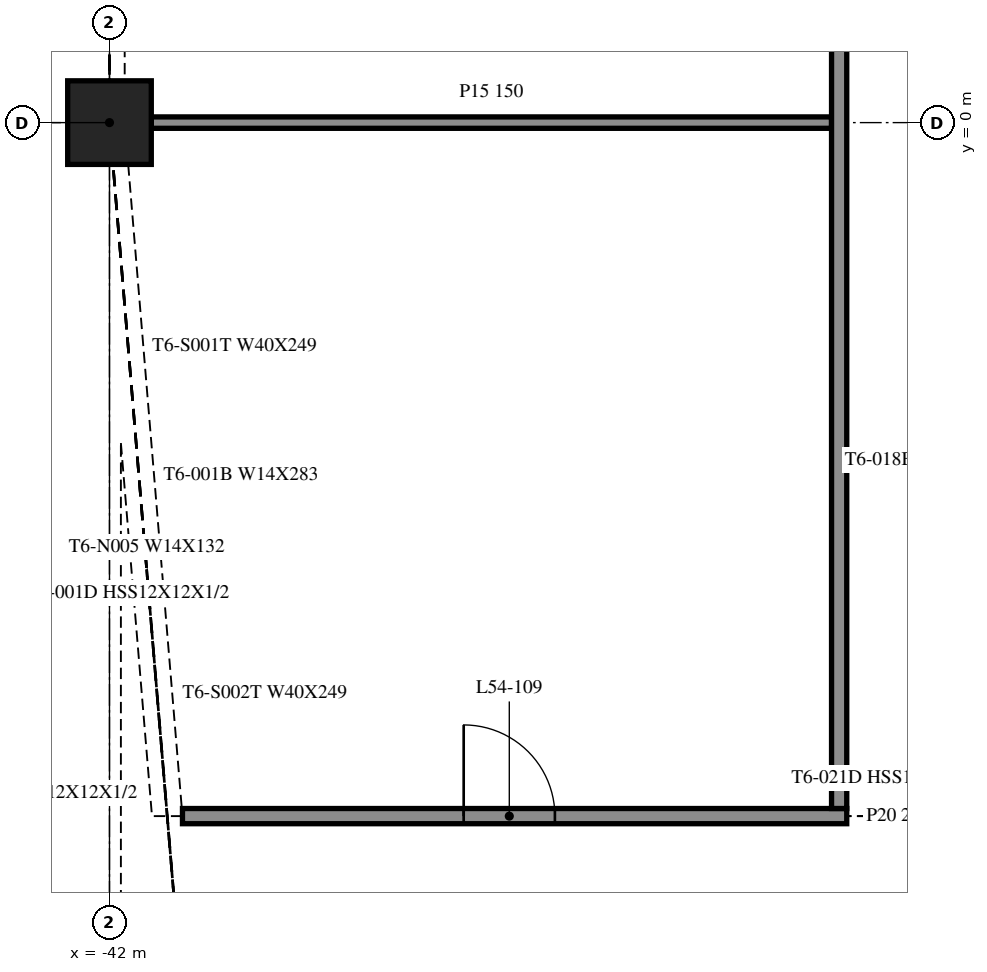
"""IFC4 building model, lengths in metres.
Left out: names, types, materials, properties, quantities, classifications, styles, units other than length and angle.
Written with IfcOpenShell. Run it as: python <this file> out.ifc"""

import sys

from ifc_helpers import new_model, si_unit, direction, frame, frame_2d, origin, origin_2d, place, context, subcontext, project, spatial, rectangle, extrude, element, fill, save


model = new_model("IFC4")
c1 = context("Model", 3, precision=1e-05, world=origin(), true_north=direction((0.0, 1.0)))
c2 = subcontext(c1, "Body", "Model", "MODEL_VIEW")
j1 = project(units=[si_unit("LENGTHUNIT", "METRE"), si_unit("PLANEANGLEUNIT", "RADIAN")], contexts=[c1])
p1 = place(None, origin())
s1 = spatial("IfcSite", under=j1, at=p1, CompositionType="ELEMENT")
p2 = place(p1, origin())
s2 = spatial("IfcBuilding", under=s1, at=p2, CompositionType="ELEMENT")
p3 = place(p2, frame((0.0, 0.0, 224.3)))
s3 = spatial("IfcBuildingStorey", under=s2, at=p3, CompositionType="ELEMENT", Elevation=224.3)
p4 = place(p3, frame((-42.0, 0.0, -0.4), z_axis=(0.0, 0.0, 1.0), x_axis=(1.0, 0.0, 0.0)))
e1 = element("IfcColumn", 1, at=p4, inside=s3, PredefinedType="COLUMN", context=c2, shape_type="SweptSolid", body=[
    extrude(rectangle(XDim=1.1, YDim=1.1, at=origin_2d()), origin(), (0.0, 0.0, 1.0), 4.36),
])
p5 = place(p3, frame((-41.04, -9.125, 0.0), z_axis=(0.0, 0.0, 1.0), x_axis=(1.0, 0.0, 0.0)))
e2 = element("IfcWall", 2, at=p5, inside=s3, PredefinedType="PARTITIONING", context=c2, shape_type="SweptSolid", body=[
    extrude(rectangle(XDim=8.74, YDim=0.2, at=frame_2d((4.37, 0.0))), origin(), (0.0, 0.0, 1.0), 3.96),
])
p6 = place(p5, frame((3.7, 0.0, 0.0)))
e3 = element("IfcOpeningElement", 3, at=p6, cuts=e2, PredefinedType="OPENING", context=c2, shape_type="SweptSolid", body=[
    extrude(rectangle(XDim=1.2, YDim=2.1, at=frame_2d((0.6, 1.05))), frame((0.0, 0.11, 0.0), z_axis=(0.0, -1.0, 0.0), x_axis=(1.0, 0.0, 0.0)), (0.0, 0.0, 1.0), 0.22),
])
p7 = place(p3, frame((-41.45, 0.0, 0.0), z_axis=(0.0, 0.0, 1.0), x_axis=(1.0, 0.0, 0.0)))
e4 = element("IfcWall", 4, at=p7, inside=s3, PredefinedType="PARTITIONING", context=c2, shape_type="SweptSolid", body=[
    extrude(rectangle(XDim=8.95, YDim=0.15, at=frame_2d((4.475, 0.0))), origin(), (0.0, 0.0, 1.0), 3.96),
])
p8 = place(p3, frame((-32.4, -9.025, 0.0), z_axis=(0.0, 0.0, 1.0), x_axis=(0.0, 1.0, 0.0)))
e5 = element("IfcWall", 5, at=p8, inside=s3, PredefinedType="PARTITIONING", context=c2, shape_type="SweptSolid", body=[
    extrude(rectangle(XDim=24.05, YDim=0.2, at=frame_2d((12.025, 0.0))), origin(), (0.0, 0.0, 1.0), 3.96),
])
p9 = place(p8, frame((11.5, 0.0, 0.0)))
e6 = element("IfcOpeningElement", 6, at=p9, cuts=e5, PredefinedType="OPENING", context=c2, shape_type="SweptSolid", body=[
    extrude(rectangle(XDim=1.2, YDim=2.1, at=frame_2d((0.6, 1.05))), frame((0.0, 0.11, 0.0), z_axis=(0.0, -1.0, 0.0), x_axis=(1.0, 0.0, 0.0)), (0.0, 0.0, 1.0), 0.22),
])
p10 = place(p6, origin())
e7 = element("IfcDoor", 7, at=p10, inside=s3, OperationType="SINGLE_SWING_LEFT", PredefinedType="DOOR", context=c2, shape_type="SweptSolid", body=[
    extrude(rectangle(XDim=1.2, YDim=2.1, at=frame_2d((0.6, 1.05))), frame((0.0, 0.025, 0.0), z_axis=(0.0, -1.0, 0.0), x_axis=(1.0, 0.0, 0.0)), (0.0, 0.0, 1.0), 0.05),
])
fill(e3, e7)
save(model, sys.argv[1])
